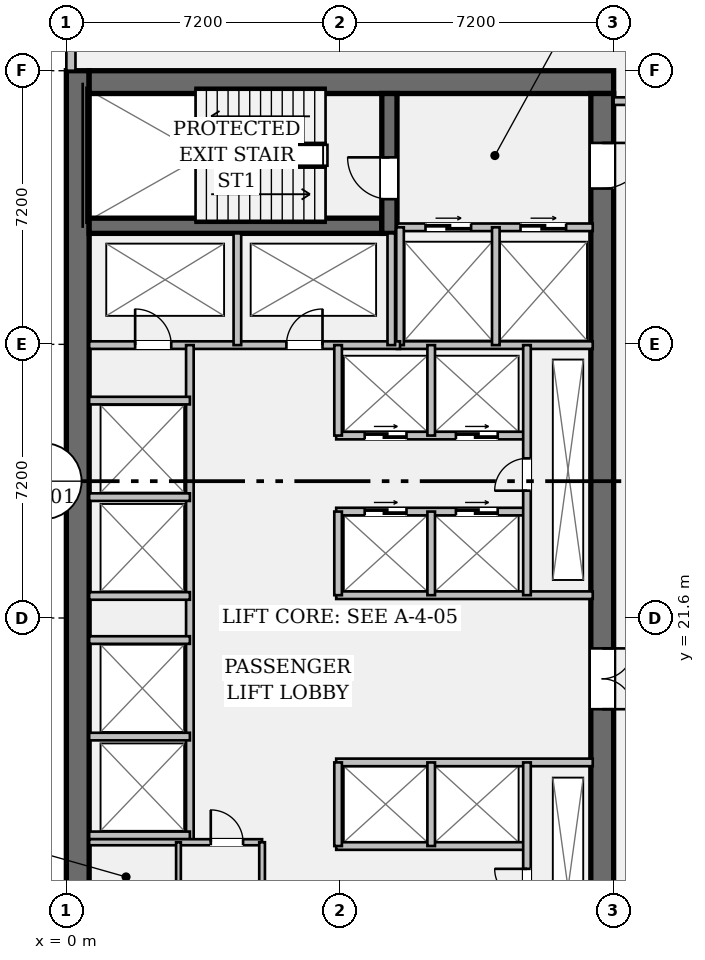
"""IFC4 building model, lengths in metres.
Left out: names, types, materials, properties, quantities, classifications, styles, units other than length and angle.
Written with IfcOpenShell. Run it as: python <this file> out.ifc"""

import sys

from ifc_helpers import new_model, si_unit, direction, frame, frame_2d, origin, place, context, subcontext, project, spatial, rectangle, extrude, element, fill, save


model = new_model("IFC4")
c1 = context("Model", 3, precision=1e-05, world=origin(), true_north=direction((0.0, 1.0)))
c2 = subcontext(c1, "Body", "Model", "MODEL_VIEW")
j1 = project(units=[si_unit("LENGTHUNIT", "METRE"), si_unit("PLANEANGLEUNIT", "RADIAN")], contexts=[c1])
p1 = place(None, origin())
s1 = spatial("IfcSite", under=j1, at=p1, CompositionType="ELEMENT")
p2 = place(p1, origin())
s2 = spatial("IfcBuilding", under=s1, at=p2, CompositionType="ELEMENT")
p3 = place(p2, frame((0.0, 0.0, 92.75)))
s3 = spatial("IfcBuildingStorey", under=s2, at=p3, CompositionType="ELEMENT", Elevation=92.75)
p4 = place(p3, frame((0.3, 7.2, 0.0), z_axis=(0.0, 0.0, 1.0), x_axis=(0.0, 1.0, 0.0)))
e1 = element("IfcWall", 1, at=p4, inside=s3, PredefinedType="SHEAR", context=c2, shape_type="SweptSolid", body=[
    extrude(rectangle(XDim=28.8, YDim=0.6, at=frame_2d((14.4, 0.0))), origin(), (0.0, 0.0, 1.0), 4.6),
])
p5 = place(p3, frame((0.6, 35.7, 0.0), z_axis=(0.0, 0.0, 1.0), x_axis=(1.0, 0.0, 0.0)))
e2 = element("IfcWall", 2, at=p5, inside=s3, PredefinedType="SHEAR", context=c2, shape_type="SweptSolid", body=[
    extrude(rectangle(XDim=13.8, YDim=0.6, at=frame_2d((6.9, 0.0))), origin(), (0.0, 0.0, 1.0), 4.6),
])
p6 = place(p3, frame((14.1, 35.4, 0.0), z_axis=(0.0, 0.0, 1.0), x_axis=(0.0, -1.0, 0.0)))
e3 = element("IfcWall", 3, at=p6, inside=s3, PredefinedType="SHEAR", context=c2, shape_type="SweptSolid", body=[
    extrude(rectangle(XDim=27.6, YDim=0.6, at=frame_2d((13.8, 0.0))), origin(), (0.0, 0.0, 1.0), 4.6),
])
p7 = place(p6, frame((1.3, 0.0, 0.0)))
e4 = element("IfcOpeningElement", 4, at=p7, cuts=e3, PredefinedType="OPENING", context=c2, shape_type="SweptSolid", body=[
    extrude(rectangle(XDim=1.2, YDim=2.15, at=frame_2d((0.6, 1.075))), frame((0.0, 0.312, 0.0), z_axis=(0.0, -1.0, 0.0), x_axis=(1.0, 0.0, 0.0)), (0.0, 0.0, 1.0), 0.624),
])
p8 = place(p6, frame((25.25, 0.0, 0.0)))
e5 = element("IfcOpeningElement", 5, at=p8, cuts=e3, PredefinedType="OPENING", context=c2, shape_type="SweptSolid", body=[
    extrude(rectangle(XDim=1.2, YDim=2.15, at=frame_2d((0.6, 1.075))), frame((0.0, 0.312, 0.0), z_axis=(0.0, -1.0, 0.0), x_axis=(1.0, 0.0, 0.0)), (0.0, 0.0, 1.0), 0.624),
])
p9 = place(p6, frame((14.6, 0.0, 0.0)))
e6 = element("IfcOpeningElement", 6, at=p9, cuts=e3, PredefinedType="OPENING", context=c2, shape_type="SweptSolid", body=[
    extrude(rectangle(XDim=1.6, YDim=2.2, at=frame_2d((0.8, 1.1))), frame((0.0, 0.312, 0.0), z_axis=(0.0, -1.0, 0.0), x_axis=(1.0, 0.0, 0.0)), (0.0, 0.0, 1.0), 0.624),
])
p10 = place(p3, frame((0.6, 31.92, 0.0), z_axis=(0.0, 0.0, 1.0), x_axis=(1.0, 0.0, 0.0)))
e7 = element("IfcWall", 7, at=p10, inside=s3, PredefinedType="SHEAR", context=c2, shape_type="SweptSolid", body=[
    extrude(rectangle(XDim=7.7, YDim=0.4, at=frame_2d((3.85, 0.0))), origin(), (0.0, 0.0, 1.0), 4.6),
])
p11 = place(p3, frame((8.5, 31.72, 0.0), z_axis=(0.0, 0.0, 1.0), x_axis=(0.0, 1.0, 0.0)))
e8 = element("IfcWall", 8, at=p11, inside=s3, PredefinedType="SHEAR", context=c2, shape_type="SweptSolid", body=[
    extrude(rectangle(XDim=3.68, YDim=0.4, at=frame_2d((1.84, 0.0))), origin(), (0.0, 0.0, 1.0), 4.6),
])
p12 = place(p11, frame((0.9, 0.0, 0.0)))
e9 = element("IfcOpeningElement", 9, at=p12, cuts=e8, PredefinedType="OPENING", context=c2, shape_type="SweptSolid", body=[
    extrude(rectangle(XDim=1.1, YDim=2.15, at=frame_2d((0.55, 1.075))), frame((0.0, 0.212, 0.0), z_axis=(0.0, -1.0, 0.0), x_axis=(1.0, 0.0, 0.0)), (0.0, 0.0, 1.0), 0.424),
])
p13 = place(p3, frame((0.12, 36.0, 0.0), z_axis=(0.0, 0.0, 1.0), x_axis=(0.0, 1.0, 0.0)))
e10 = element("IfcWall", 10, at=p13, inside=s3, PredefinedType="STANDARD", context=c2, shape_type="SweptSolid", body=[
    extrude(rectangle(XDim=4.38, YDim=0.24, at=frame_2d((2.19, 0.0))), origin(), (0.0, 0.0, 1.0), 4.6),
])
p14 = place(p3, frame((8.7, 31.88, 0.0), z_axis=(0.0, 0.0, 1.0), x_axis=(1.0, 0.0, 0.0)))
e11 = element("IfcWall", 11, at=p14, inside=s3, PredefinedType="PARTITIONING", context=c2, shape_type="SweptSolid", body=[
    extrude(rectangle(XDim=5.15, YDim=0.2, at=frame_2d((2.575, 0.0))), origin(), (0.0, 0.0, 1.0), 4.6),
])
p15 = place(p14, frame((0.75, 0.0, 0.0)))
e12 = element("IfcOpeningElement", 12, at=p15, cuts=e11, PredefinedType="OPENING", context=c2, shape_type="SweptSolid", body=[
    extrude(rectangle(XDim=1.2, YDim=2.2, at=frame_2d((0.6, 1.1))), frame((0.0, 0.112, 0.0), z_axis=(0.0, -1.0, 0.0), x_axis=(1.0, 0.0, 0.0)), (0.0, 0.0, 1.0), 0.224),
])
p16 = place(p14, frame((3.25, 0.0, 0.0)))
e13 = element("IfcOpeningElement", 13, at=p16, cuts=e11, PredefinedType="OPENING", context=c2, shape_type="SweptSolid", body=[
    extrude(rectangle(XDim=1.2, YDim=2.2, at=frame_2d((0.6, 1.1))), frame((0.0, 0.112, 0.0), z_axis=(0.0, -1.0, 0.0), x_axis=(1.0, 0.0, 0.0)), (0.0, 0.0, 1.0), 0.224),
])
p17 = place(p3, frame((8.7, 28.78, 0.0), z_axis=(0.0, 0.0, 1.0), x_axis=(1.0, 0.0, 0.0)))
e14 = element("IfcWall", 14, at=p17, inside=s3, PredefinedType="PARTITIONING", context=c2, shape_type="SweptSolid", body=[
    extrude(rectangle(XDim=5.15, YDim=0.2, at=frame_2d((2.575, 0.0))), origin(), (0.0, 0.0, 1.0), 4.6),
])
for number, where, z_axis, x_axis in (
    (15, (8.78, 28.78, 0.0), (0.0, 0.0, 1.0), (0.0, 1.0, 0.0)),
    (16, (11.3, 28.78, 0.0), (0.0, 0.0, 1.0), (0.0, 1.0, 0.0)),
):
    element("IfcWall", number, at=place(p3, frame(where, z_axis=z_axis, x_axis=x_axis)), inside=s3, PredefinedType="PARTITIONING", context=c2, shape_type="SweptSolid", body=[
        extrude(rectangle(XDim=3.1, YDim=0.2, at=frame_2d((1.55, 0.0))), origin(), (0.0, 0.0, 1.0), 4.6),
    ])
p18 = place(p3, frame((0.6, 28.78, 0.0), z_axis=(0.0, 0.0, 1.0), x_axis=(1.0, 0.0, 0.0)))
e17 = element("IfcWall", 17, at=p18, inside=s3, PredefinedType="PARTITIONING", context=c2, shape_type="SweptSolid", body=[
    extrude(rectangle(XDim=8.18, YDim=0.2, at=frame_2d((4.09, 0.0))), origin(), (0.0, 0.0, 1.0), 4.6),
])
p19 = place(p18, frame((1.21, 0.0, 0.0)))
e18 = element("IfcOpeningElement", 18, at=p19, cuts=e17, PredefinedType="OPENING", context=c2, shape_type="SweptSolid", body=[
    extrude(rectangle(XDim=0.95, YDim=2.15, at=frame_2d((0.475, 1.075))), frame((0.0, 0.112, 0.0), z_axis=(0.0, -1.0, 0.0), x_axis=(1.0, 0.0, 0.0)), (0.0, 0.0, 1.0), 0.224),
])
p20 = place(p18, frame((5.19, 0.0, 0.0)))
e19 = element("IfcOpeningElement", 19, at=p20, cuts=e17, PredefinedType="OPENING", context=c2, shape_type="SweptSolid", body=[
    extrude(rectangle(XDim=0.95, YDim=2.15, at=frame_2d((0.475, 1.075))), frame((0.0, 0.112, 0.0), z_axis=(0.0, -1.0, 0.0), x_axis=(1.0, 0.0, 0.0)), (0.0, 0.0, 1.0), 0.224),
])
for number, where, z_axis, x_axis in (
    (20, (4.5, 28.78, 0.0), (0.0, 0.0, 1.0), (0.0, 1.0, 0.0)),
    (21, (8.55, 28.78, 0.0), (0.0, 0.0, 1.0), (0.0, 1.0, 0.0)),
):
    element("IfcWall", number, at=place(p3, frame(where, z_axis=z_axis, x_axis=x_axis)), inside=s3, PredefinedType="PARTITIONING", context=c2, shape_type="SweptSolid", body=[
        extrude(rectangle(XDim=2.94, YDim=0.2, at=frame_2d((1.47, 0.0))), origin(), (0.0, 0.0, 1.0), 4.6),
    ])
p21 = place(p3, frame((3.25, 15.7, 0.0), z_axis=(0.0, 0.0, 1.0), x_axis=(0.0, 1.0, 0.0)))
e22 = element("IfcWall", 22, at=p21, inside=s3, PredefinedType="PARTITIONING", context=c2, shape_type="SweptSolid", body=[
    extrude(rectangle(XDim=13.08, YDim=0.2, at=frame_2d((6.54, 0.0))), origin(), (0.0, 0.0, 1.0), 4.6),
])
for number, where, z_axis, x_axis in (
    (23, (0.6, 15.88, 0.0), (0.0, 0.0, 1.0), (1.0, 0.0, 0.0)),
    (24, (0.6, 18.48, 0.0), (0.0, 0.0, 1.0), (1.0, 0.0, 0.0)),
    (25, (0.6, 22.18, 0.0), (0.0, 0.0, 1.0), (1.0, 0.0, 0.0)),
    (26, (0.6, 24.78, 0.0), (0.0, 0.0, 1.0), (1.0, 0.0, 0.0)),
    (27, (0.6, 21.02, 0.0), (0.0, 0.0, 1.0), (1.0, 0.0, 0.0)),
    (28, (0.6, 27.32, 0.0), (0.0, 0.0, 1.0), (1.0, 0.0, 0.0)),
):
    element("IfcWall", number, at=place(p3, frame(where, z_axis=z_axis, x_axis=x_axis)), inside=s3, PredefinedType="PARTITIONING", context=c2, shape_type="SweptSolid", body=[
        extrude(rectangle(XDim=2.65, YDim=0.2, at=frame_2d((1.325, 0.0))), origin(), (0.0, 0.0, 1.0), 4.6),
    ])
p22 = place(p3, frame((7.1, 22.2, 0.0), z_axis=(0.0, 0.0, 1.0), x_axis=(1.0, 0.0, 0.0)))
e29 = element("IfcWall", 29, at=p22, inside=s3, PredefinedType="PARTITIONING", context=c2, shape_type="SweptSolid", body=[
    extrude(rectangle(XDim=6.75, YDim=0.2, at=frame_2d((3.375, 0.0))), origin(), (0.0, 0.0, 1.0), 4.6),
])
p23 = place(p3, frame((7.1, 24.4, 0.0), z_axis=(0.0, 0.0, 1.0), x_axis=(1.0, 0.0, 0.0)))
e30 = element("IfcWall", 30, at=p23, inside=s3, PredefinedType="PARTITIONING", context=c2, shape_type="SweptSolid", body=[
    extrude(rectangle(XDim=5.02, YDim=0.2, at=frame_2d((2.51, 0.0))), origin(), (0.0, 0.0, 1.0), 4.6),
])
p24 = place(p23, frame((0.75, 0.0, 0.0)))
e31 = element("IfcOpeningElement", 31, at=p24, cuts=e30, PredefinedType="OPENING", context=c2, shape_type="SweptSolid", body=[
    extrude(rectangle(XDim=1.1, YDim=2.2, at=frame_2d((0.55, 1.1))), frame((0.0, 0.112, 0.0), z_axis=(0.0, -1.0, 0.0), x_axis=(1.0, 0.0, 0.0)), (0.0, 0.0, 1.0), 0.224),
])
p25 = place(p23, frame((3.15, 0.0, 0.0)))
e32 = element("IfcOpeningElement", 32, at=p25, cuts=e30, PredefinedType="OPENING", context=c2, shape_type="SweptSolid", body=[
    extrude(rectangle(XDim=1.1, YDim=2.2, at=frame_2d((0.55, 1.1))), frame((0.0, 0.112, 0.0), z_axis=(0.0, -1.0, 0.0), x_axis=(1.0, 0.0, 0.0)), (0.0, 0.0, 1.0), 0.224),
])
p26 = place(p3, frame((7.1, 26.4, 0.0), z_axis=(0.0, 0.0, 1.0), x_axis=(1.0, 0.0, 0.0)))
e33 = element("IfcWall", 33, at=p26, inside=s3, PredefinedType="PARTITIONING", context=c2, shape_type="SweptSolid", body=[
    extrude(rectangle(XDim=5.02, YDim=0.2, at=frame_2d((2.51, 0.0))), origin(), (0.0, 0.0, 1.0), 4.6),
])
p27 = place(p26, frame((0.75, 0.0, 0.0)))
e34 = element("IfcOpeningElement", 34, at=p27, cuts=e33, PredefinedType="OPENING", context=c2, shape_type="SweptSolid", body=[
    extrude(rectangle(XDim=1.1, YDim=2.2, at=frame_2d((0.55, 1.1))), frame((0.0, 0.112, 0.0), z_axis=(0.0, -1.0, 0.0), x_axis=(1.0, 0.0, 0.0)), (0.0, 0.0, 1.0), 0.224),
])
p28 = place(p26, frame((3.15, 0.0, 0.0)))
e35 = element("IfcOpeningElement", 35, at=p28, cuts=e33, PredefinedType="OPENING", context=c2, shape_type="SweptSolid", body=[
    extrude(rectangle(XDim=1.1, YDim=2.2, at=frame_2d((0.55, 1.1))), frame((0.0, 0.112, 0.0), z_axis=(0.0, -1.0, 0.0), x_axis=(1.0, 0.0, 0.0)), (0.0, 0.0, 1.0), 0.224),
])
p29 = place(p3, frame((7.15, 22.2, 0.0), z_axis=(0.0, 0.0, 1.0), x_axis=(0.0, 1.0, 0.0)))
e36 = element("IfcWall", 36, at=p29, inside=s3, PredefinedType="PARTITIONING", context=c2, shape_type="SweptSolid", body=[
    extrude(rectangle(XDim=2.2, YDim=0.2, at=frame_2d((1.1, 0.0))), origin(), (0.0, 0.0, 1.0), 4.6),
])
p30 = place(p3, frame((7.15, 26.4, 0.0), z_axis=(0.0, 0.0, 1.0), x_axis=(0.0, 1.0, 0.0)))
e37 = element("IfcWall", 37, at=p30, inside=s3, PredefinedType="PARTITIONING", context=c2, shape_type="SweptSolid", body=[
    extrude(rectangle(XDim=2.38, YDim=0.2, at=frame_2d((1.19, 0.0))), origin(), (0.0, 0.0, 1.0), 4.6),
])
p31 = place(p3, frame((9.6, 22.2, 0.0), z_axis=(0.0, 0.0, 1.0), x_axis=(0.0, 1.0, 0.0)))
e38 = element("IfcWall", 38, at=p31, inside=s3, PredefinedType="PARTITIONING", context=c2, shape_type="SweptSolid", body=[
    extrude(rectangle(XDim=2.2, YDim=0.2, at=frame_2d((1.1, 0.0))), origin(), (0.0, 0.0, 1.0), 4.6),
])
p32 = place(p3, frame((9.6, 26.4, 0.0), z_axis=(0.0, 0.0, 1.0), x_axis=(0.0, 1.0, 0.0)))
e39 = element("IfcWall", 39, at=p32, inside=s3, PredefinedType="PARTITIONING", context=c2, shape_type="SweptSolid", body=[
    extrude(rectangle(XDim=2.38, YDim=0.2, at=frame_2d((1.19, 0.0))), origin(), (0.0, 0.0, 1.0), 4.6),
])
p33 = place(p3, frame((12.12, 22.2, 0.0), z_axis=(0.0, 0.0, 1.0), x_axis=(0.0, 1.0, 0.0)))
e40 = element("IfcWall", 40, at=p33, inside=s3, PredefinedType="PARTITIONING", context=c2, shape_type="SweptSolid", body=[
    extrude(rectangle(XDim=6.58, YDim=0.2, at=frame_2d((3.29, 0.0))), origin(), (0.0, 0.0, 1.0), 4.6),
])
p34 = place(p33, frame((2.75, 0.0, 0.0)))
e41 = element("IfcOpeningElement", 41, at=p34, cuts=e40, PredefinedType="OPENING", context=c2, shape_type="SweptSolid", body=[
    extrude(rectangle(XDim=0.85, YDim=2.15, at=frame_2d((0.425, 1.075))), frame((0.0, 0.112, 0.0), z_axis=(0.0, -1.0, 0.0), x_axis=(1.0, 0.0, 0.0)), (0.0, 0.0, 1.0), 0.224),
])
p35 = place(p3, frame((7.1, 17.8, 0.0), z_axis=(0.0, 0.0, 1.0), x_axis=(1.0, 0.0, 0.0)))
e42 = element("IfcWall", 42, at=p35, inside=s3, PredefinedType="PARTITIONING", context=c2, shape_type="SweptSolid", body=[
    extrude(rectangle(XDim=6.75, YDim=0.2, at=frame_2d((3.375, 0.0))), origin(), (0.0, 0.0, 1.0), 4.6),
])
p36 = place(p3, frame((7.1, 15.6, 0.0), z_axis=(0.0, 0.0, 1.0), x_axis=(1.0, 0.0, 0.0)))
e43 = element("IfcWall", 43, at=p36, inside=s3, PredefinedType="PARTITIONING", context=c2, shape_type="SweptSolid", body=[
    extrude(rectangle(XDim=5.02, YDim=0.2, at=frame_2d((2.51, 0.0))), origin(), (0.0, 0.0, 1.0), 4.6),
])
for number, where, z_axis, x_axis in (
    (44, (7.15, 15.6, 0.0), (0.0, 0.0, 1.0), (0.0, 1.0, 0.0)),
    (45, (9.6, 15.6, 0.0), (0.0, 0.0, 1.0), (0.0, 1.0, 0.0)),
):
    element("IfcWall", number, at=place(p3, frame(where, z_axis=z_axis, x_axis=x_axis)), inside=s3, PredefinedType="PARTITIONING", context=c2, shape_type="SweptSolid", body=[
        extrude(rectangle(XDim=2.2, YDim=0.2, at=frame_2d((1.1, 0.0))), origin(), (0.0, 0.0, 1.0), 4.6),
    ])
p37 = place(p3, frame((12.12, 11.2, 0.0), z_axis=(0.0, 0.0, 1.0), x_axis=(0.0, 1.0, 0.0)))
e46 = element("IfcWall", 46, at=p37, inside=s3, PredefinedType="PARTITIONING", context=c2, shape_type="SweptSolid", body=[
    extrude(rectangle(XDim=6.6, YDim=0.2, at=frame_2d((3.3, 0.0))), origin(), (0.0, 0.0, 1.0), 4.6),
])
p38 = place(p37, frame((2.95, 0.0, 0.0)))
e47 = element("IfcOpeningElement", 47, at=p38, cuts=e46, PredefinedType="OPENING", context=c2, shape_type="SweptSolid", body=[
    extrude(rectangle(XDim=0.85, YDim=2.15, at=frame_2d((0.425, 1.075))), frame((0.0, 0.112, 0.0), z_axis=(0.0, -1.0, 0.0), x_axis=(1.0, 0.0, 0.0)), (0.0, 0.0, 1.0), 0.224),
])
p39 = place(p3, frame((0.6, 15.7, 0.0), z_axis=(0.0, 0.0, 1.0), x_axis=(1.0, 0.0, 0.0)))
e48 = element("IfcWall", 48, at=p39, inside=s3, PredefinedType="PARTITIONING", context=c2, shape_type="SweptSolid", body=[
    extrude(rectangle(XDim=4.55, YDim=0.16, at=frame_2d((2.275, 0.0))), origin(), (0.0, 0.0, 1.0), 4.6),
])
p40 = place(p39, frame((3.2, 0.0, 0.0)))
e49 = element("IfcOpeningElement", 49, at=p40, cuts=e48, PredefinedType="OPENING", context=c2, shape_type="SweptSolid", body=[
    extrude(rectangle(XDim=0.85, YDim=2.15, at=frame_2d((0.425, 1.075))), frame((0.0, 0.092, 0.0), z_axis=(0.0, -1.0, 0.0), x_axis=(1.0, 0.0, 0.0)), (0.0, 0.0, 1.0), 0.184),
])
p41 = place(p3, frame((5.15, 11.28, 0.0), z_axis=(0.0, 0.0, 1.0), x_axis=(0.0, 1.0, 0.0)))
e50 = element("IfcWall", 50, at=p41, inside=s3, PredefinedType="PARTITIONING", context=c2, shape_type="SweptSolid", body=[
    extrude(rectangle(XDim=4.42, YDim=0.15, at=frame_2d((2.21, 0.0))), origin(), (0.0, 0.0, 1.0), 4.6),
])
p42 = place(p3, frame((2.95, 11.28, 0.0), z_axis=(0.0, 0.0, 1.0), x_axis=(0.0, 1.0, 0.0)))
e51 = element("IfcWall", 51, at=p42, inside=s3, PredefinedType="PARTITIONING", context=c2, shape_type="SweptSolid", body=[
    extrude(rectangle(XDim=4.42, YDim=0.125, at=frame_2d((2.21, 0.0))), origin(), (0.0, 0.0, 1.0), 4.6),
])
p43 = place(p42, frame((1.6, 0.0, 0.0)))
e52 = element("IfcOpeningElement", 52, at=p43, cuts=e51, PredefinedType="OPENING", context=c2, shape_type="SweptSolid", body=[
    extrude(rectangle(XDim=0.85, YDim=2.15, at=frame_2d((0.425, 1.075))), frame((0.0, 0.074, 0.0), z_axis=(0.0, -1.0, 0.0), x_axis=(1.0, 0.0, 0.0)), (0.0, 0.0, 1.0), 0.149),
])
p44 = place(p3, frame((14.4, 35.2, 0.0), z_axis=(0.0, 0.0, 1.0), x_axis=(1.0, 0.0, 0.0)))
e53 = element("IfcWall", 53, at=p44, inside=s3, PredefinedType="PARTITIONING", context=c2, shape_type="SweptSolid", body=[
    extrude(rectangle(XDim=2.95, YDim=0.2, at=frame_2d((1.475, 0.0))), origin(), (0.0, 0.0, 1.0), 3.813),
])
p45 = place(p44, frame((0.9, 0.0, 0.0)))
e54 = element("IfcOpeningElement", 54, at=p45, cuts=e53, PredefinedType="OPENING", context=c2, shape_type="SweptSolid", body=[
    extrude(rectangle(XDim=1.0, YDim=2.15, at=frame_2d((0.5, 1.075))), frame((0.0, 0.112, 0.0), z_axis=(0.0, -1.0, 0.0), x_axis=(1.0, 0.0, 0.0)), (0.0, 0.0, 1.0), 0.224),
])
p46 = place(p12, origin())
e55 = element("IfcDoor", 55, at=p46, inside=s3, OperationType="SINGLE_SWING_RIGHT", PredefinedType="DOOR", context=c2, shape_type="SweptSolid", body=[
    extrude(rectangle(XDim=1.1, YDim=2.15, at=frame_2d((0.55, 1.075))), frame((0.0, 0.025, 0.0), z_axis=(0.0, -1.0, 0.0), x_axis=(1.0, 0.0, 0.0)), (0.0, 0.0, 1.0), 0.05),
])
fill(e9, e55)
p47 = place(p7, origin())
e56 = element("IfcDoor", 56, at=p47, inside=s3, OperationType="SINGLE_SWING_LEFT", PredefinedType="DOOR", context=c2, shape_type="SweptSolid", body=[
    extrude(rectangle(XDim=1.2, YDim=2.15, at=frame_2d((0.6, 1.075))), frame((0.0, 0.025, 0.0), z_axis=(0.0, -1.0, 0.0), x_axis=(1.0, 0.0, 0.0)), (0.0, 0.0, 1.0), 0.05),
])
fill(e4, e56)
p48 = place(p15, origin())
e57 = element("IfcDoor", 57, at=p48, inside=s3, OperationType="DOUBLE_DOOR_SLIDING", PredefinedType="DOOR", context=c2, shape_type="SweptSolid", body=[
    extrude(rectangle(XDim=1.2, YDim=2.2, at=frame_2d((0.6, 1.1))), frame((0.0, 0.025, 0.0), z_axis=(0.0, -1.0, 0.0), x_axis=(1.0, 0.0, 0.0)), (0.0, 0.0, 1.0), 0.05),
])
fill(e12, e57)
p49 = place(p16, origin())
e58 = element("IfcDoor", 58, at=p49, inside=s3, OperationType="DOUBLE_DOOR_SLIDING", PredefinedType="DOOR", context=c2, shape_type="SweptSolid", body=[
    extrude(rectangle(XDim=1.2, YDim=2.2, at=frame_2d((0.6, 1.1))), frame((0.0, 0.025, 0.0), z_axis=(0.0, -1.0, 0.0), x_axis=(1.0, 0.0, 0.0)), (0.0, 0.0, 1.0), 0.05),
])
fill(e13, e58)
p50 = place(p19, origin())
e59 = element("IfcDoor", 59, at=p50, inside=s3, OperationType="SINGLE_SWING_LEFT", PredefinedType="DOOR", context=c2, shape_type="SweptSolid", body=[
    extrude(rectangle(XDim=0.95, YDim=2.15, at=frame_2d((0.475, 1.075))), frame((0.0, 0.025, 0.0), z_axis=(0.0, -1.0, 0.0), x_axis=(1.0, 0.0, 0.0)), (0.0, 0.0, 1.0), 0.05),
])
fill(e18, e59)
p51 = place(p20, origin())
e60 = element("IfcDoor", 60, at=p51, inside=s3, OperationType="SINGLE_SWING_RIGHT", PredefinedType="DOOR", context=c2, shape_type="SweptSolid", body=[
    extrude(rectangle(XDim=0.95, YDim=2.15, at=frame_2d((0.475, 1.075))), frame((0.0, 0.025, 0.0), z_axis=(0.0, -1.0, 0.0), x_axis=(1.0, 0.0, 0.0)), (0.0, 0.0, 1.0), 0.05),
])
fill(e19, e60)
p52 = place(p9, origin())
e61 = element("IfcDoor", 61, at=p52, inside=s3, OperationType="DOUBLE_DOOR_SINGLE_SWING", PredefinedType="DOOR", context=c2, shape_type="SweptSolid", body=[
    extrude(rectangle(XDim=1.6, YDim=2.2, at=frame_2d((0.8, 1.1))), frame((0.0, 0.025, 0.0), z_axis=(0.0, -1.0, 0.0), x_axis=(1.0, 0.0, 0.0)), (0.0, 0.0, 1.0), 0.05),
])
fill(e6, e61)
p53 = place(p34, origin())
e62 = element("IfcDoor", 62, at=p53, inside=s3, OperationType="SINGLE_SWING_LEFT", PredefinedType="DOOR", context=c2, shape_type="SweptSolid", body=[
    extrude(rectangle(XDim=0.85, YDim=2.15, at=frame_2d((0.425, 1.075))), frame((0.0, 0.025, 0.0), z_axis=(0.0, -1.0, 0.0), x_axis=(1.0, 0.0, 0.0)), (0.0, 0.0, 1.0), 0.05),
])
fill(e41, e62)
p54 = place(p24, origin())
e63 = element("IfcDoor", 63, at=p54, inside=s3, OperationType="DOUBLE_DOOR_SLIDING", PredefinedType="DOOR", context=c2, shape_type="SweptSolid", body=[
    extrude(rectangle(XDim=1.1, YDim=2.2, at=frame_2d((0.55, 1.1))), frame((0.0, 0.025, 0.0), z_axis=(0.0, -1.0, 0.0), x_axis=(1.0, 0.0, 0.0)), (0.0, 0.0, 1.0), 0.05),
])
fill(e31, e63)
p55 = place(p25, origin())
e64 = element("IfcDoor", 64, at=p55, inside=s3, OperationType="DOUBLE_DOOR_SLIDING", PredefinedType="DOOR", context=c2, shape_type="SweptSolid", body=[
    extrude(rectangle(XDim=1.1, YDim=2.2, at=frame_2d((0.55, 1.1))), frame((0.0, 0.025, 0.0), z_axis=(0.0, -1.0, 0.0), x_axis=(1.0, 0.0, 0.0)), (0.0, 0.0, 1.0), 0.05),
])
fill(e32, e64)
p56 = place(p27, origin())
e65 = element("IfcDoor", 65, at=p56, inside=s3, OperationType="DOUBLE_DOOR_SLIDING", PredefinedType="DOOR", context=c2, shape_type="SweptSolid", body=[
    extrude(rectangle(XDim=1.1, YDim=2.2, at=frame_2d((0.55, 1.1))), frame((0.0, 0.025, 0.0), z_axis=(0.0, -1.0, 0.0), x_axis=(1.0, 0.0, 0.0)), (0.0, 0.0, 1.0), 0.05),
])
fill(e34, e65)
p57 = place(p28, origin())
e66 = element("IfcDoor", 66, at=p57, inside=s3, OperationType="DOUBLE_DOOR_SLIDING", PredefinedType="DOOR", context=c2, shape_type="SweptSolid", body=[
    extrude(rectangle(XDim=1.1, YDim=2.2, at=frame_2d((0.55, 1.1))), frame((0.0, 0.025, 0.0), z_axis=(0.0, -1.0, 0.0), x_axis=(1.0, 0.0, 0.0)), (0.0, 0.0, 1.0), 0.05),
])
fill(e35, e66)
p58 = place(p38, origin())
e67 = element("IfcDoor", 67, at=p58, inside=s3, OperationType="SINGLE_SWING_RIGHT", PredefinedType="DOOR", context=c2, shape_type="SweptSolid", body=[
    extrude(rectangle(XDim=0.85, YDim=2.15, at=frame_2d((0.425, 1.075))), frame((0.0, 0.025, 0.0), z_axis=(0.0, -1.0, 0.0), x_axis=(1.0, 0.0, 0.0)), (0.0, 0.0, 1.0), 0.05),
])
fill(e47, e67)
p59 = place(p40, origin())
e68 = element("IfcDoor", 68, at=p59, inside=s3, OperationType="SINGLE_SWING_LEFT", PredefinedType="DOOR", context=c2, shape_type="SweptSolid", body=[
    extrude(rectangle(XDim=0.85, YDim=2.15, at=frame_2d((0.425, 1.075))), frame((0.0, 0.025, 0.0), z_axis=(0.0, -1.0, 0.0), x_axis=(1.0, 0.0, 0.0)), (0.0, 0.0, 1.0), 0.05),
])
fill(e49, e68)
save(model, sys.argv[1])
